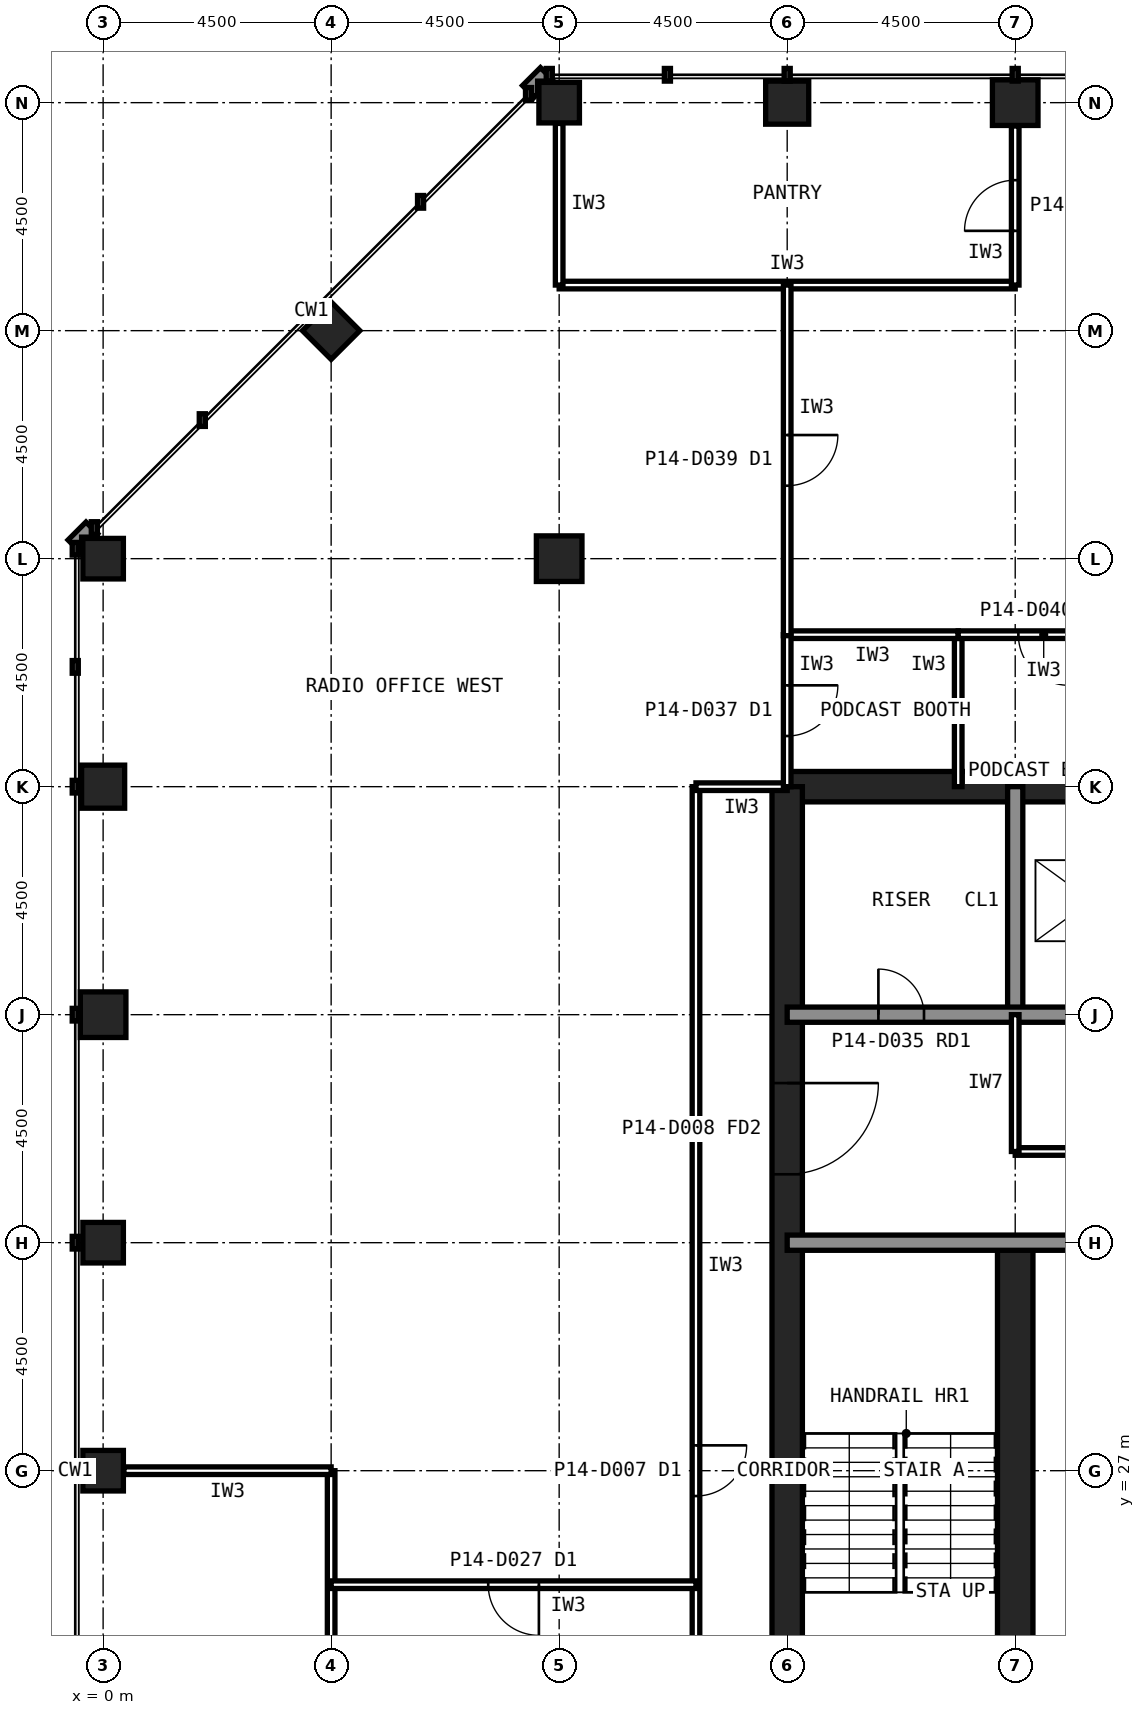
"""IFC4 building model, lengths in metres.
Left out: names, types, materials, properties, quantities, classifications, styles, units other than length and angle.
Written with IfcOpenShell. Run it as: python <this file> out.ifc"""

import sys

from ifc_helpers import new_model, si_unit, direction, frame, frame_2d, origin, origin_2d, place, context, subcontext, project, spatial, rectangle, hollow_rectangle, extrude, element, fill, save


model = new_model("IFC4")
c1 = context("Model", 3, precision=1e-05, world=origin(), true_north=direction((0.0, 1.0)))
c2 = subcontext(c1, "Body", "Model", "MODEL_VIEW")
j1 = project(units=[si_unit("LENGTHUNIT", "METRE"), si_unit("PLANEANGLEUNIT", "RADIAN")], contexts=[c1])
p1 = place(None, origin())
s1 = spatial("IfcSite", under=j1, at=p1, CompositionType="ELEMENT")
p2 = place(p1, origin())
s2 = spatial("IfcBuilding", under=s1, at=p2, CompositionType="ELEMENT")
p3 = place(p2, frame((0.0, 0.0, 62.6)))
s3 = spatial("IfcBuildingStorey", under=s2, at=p3, CompositionType="ELEMENT", Elevation=62.6)
p4 = place(p3, frame((18.0, 54.0, 0.0), z_axis=(0.0, 0.0, 1.0), x_axis=(1.0, 0.0, 0.0)))
e1 = element("IfcColumn", 1, at=p4, inside=s3, PredefinedType="COLUMN", context=c2, shape_type="SweptSolid", body=[
    extrude(hollow_rectangle(XDim=0.9, YDim=0.9, WallThickness=0.063, at=origin_2d()), origin(), (0.0, 0.0, 1.0), 4.2),
])
p5 = place(p3, frame((13.5, 54.0, 0.0), z_axis=(0.0, 0.0, 1.0), x_axis=(1.0, 0.0, 0.0)))
e2 = element("IfcColumn", 2, at=p5, inside=s3, PredefinedType="COLUMN", context=c2, shape_type="SweptSolid", body=[
    extrude(hollow_rectangle(XDim=0.85, YDim=0.85, WallThickness=0.05, at=origin_2d()), origin(), (0.0, 0.0, 1.0), 4.2),
])
for number, where, z_axis, x_axis in (
    (3, (9.0, 54.0, 0.0), (0.0, 0.0, 1.0), (1.0, 0.0, 0.0)),
    (4, (0.0, 45.0, 0.0), (0.0, 0.0, 1.0), (1.0, 0.0, 0.0)),
):
    element("IfcColumn", number, at=place(p3, frame(where, z_axis=z_axis, x_axis=x_axis)), inside=s3, PredefinedType="COLUMN", context=c2, shape_type="SweptSolid", body=[
        extrude(hollow_rectangle(XDim=0.8, YDim=0.8, WallThickness=0.045, at=origin_2d()), origin(), (0.0, 0.0, 1.0), 4.2),
    ])
p6 = place(p3, frame((0.0, 40.5, 0.0), z_axis=(0.0, 0.0, 1.0), x_axis=(1.0, 0.0, 0.0)))
e5 = element("IfcColumn", 5, at=p6, inside=s3, PredefinedType="COLUMN", context=c2, shape_type="SweptSolid", body=[
    extrude(hollow_rectangle(XDim=0.85, YDim=0.85, WallThickness=0.05, at=origin_2d()), origin(), (0.0, 0.0, 1.0), 4.2),
])
p7 = place(p3, frame((0.0, 36.0, 0.0), z_axis=(0.0, 0.0, 1.0), x_axis=(1.0, 0.0, 0.0)))
e6 = element("IfcColumn", 6, at=p7, inside=s3, PredefinedType="COLUMN", context=c2, shape_type="SweptSolid", body=[
    extrude(hollow_rectangle(XDim=0.9, YDim=0.9, WallThickness=0.063, at=origin_2d()), origin(), (0.0, 0.0, 1.0), 4.2),
])
for number, where, z_axis, x_axis in (
    (7, (0.0, 31.5, 0.0), (0.0, 0.0, 1.0), (1.0, 0.0, 0.0)),
    (8, (0.0, 27.0, 0.0), (0.0, 0.0, 1.0), (1.0, 0.0, 0.0)),
    (9, (4.5, 49.5, 0.0), (0.0, 0.0, 1.0), (0.707, 0.707, 0.0)),
):
    element("IfcColumn", number, at=place(p3, frame(where, z_axis=z_axis, x_axis=x_axis)), inside=s3, PredefinedType="COLUMN", context=c2, shape_type="SweptSolid", body=[
        extrude(hollow_rectangle(XDim=0.8, YDim=0.8, WallThickness=0.045, at=origin_2d()), origin(), (0.0, 0.0, 1.0), 4.2),
    ])
p8 = place(p3, frame((9.0, 45.0, 0.0), z_axis=(0.0, 0.0, 1.0), x_axis=(1.0, 0.0, 0.0)))
e10 = element("IfcColumn", 10, at=p8, inside=s3, PredefinedType="COLUMN", context=c2, shape_type="SweptSolid", body=[
    extrude(hollow_rectangle(XDim=0.9, YDim=0.9, WallThickness=0.063, at=origin_2d()), origin(), (0.0, 0.0, 1.0), 4.2),
])
p9 = place(p3, frame((40.5, 40.5, 0.0), z_axis=(0.0, 0.0, 1.0), x_axis=(-1.0, 0.0, 0.0)))
e11 = element("IfcWall", 11, at=p9, inside=s3, PredefinedType="SHEAR", context=c2, shape_type="SweptSolid", body=[
    extrude(rectangle(XDim=27.0, YDim=0.6, at=frame_2d((13.5, 0.0))), origin(), (0.0, 0.0, 1.0), 4.2),
])
p10 = place(p3, frame((13.5, 40.5, 0.0), z_axis=(0.0, 0.0, 1.0), x_axis=(0.0, -1.0, 0.0)))
e12 = element("IfcWall", 12, at=p10, inside=s3, PredefinedType="SHEAR", context=c2, shape_type="SweptSolid", body=[
    extrude(rectangle(XDim=27.0, YDim=0.6, at=frame_2d((13.5, 0.0))), origin(), (0.0, 0.0, 1.0), 4.2),
])
p11 = place(p10, frame((19.65, 0.0, 0.0)))
e13 = element("IfcOpeningElement", 13, at=p11, cuts=e12, PredefinedType="OPENING", context=c2, shape_type="SweptSolid", body=[
    extrude(rectangle(XDim=1.2, YDim=2.1, at=frame_2d((0.6, 1.05))), frame((0.0, 0.31, 0.0), z_axis=(0.0, -1.0, 0.0), x_axis=(1.0, 0.0, 0.0)), (0.0, 0.0, 1.0), 0.62),
])
p12 = place(p10, frame((5.85, 0.0, 0.0)))
e14 = element("IfcOpeningElement", 14, at=p12, cuts=e12, PredefinedType="OPENING", context=c2, shape_type="SweptSolid", body=[
    extrude(rectangle(XDim=1.8, YDim=2.1, at=frame_2d((0.9, 1.05))), frame((0.0, 0.31, 0.0), z_axis=(0.0, -1.0, 0.0), x_axis=(1.0, 0.0, 0.0)), (0.0, 0.0, 1.0), 0.62),
])
p13 = place(p3, frame((18.0, 13.5, 0.0), z_axis=(0.0, 0.0, 1.0), x_axis=(0.0, 1.0, 0.0)))
e15 = element("IfcWall", 15, at=p13, inside=s3, PredefinedType="SHEAR", context=c2, shape_type="SweptSolid", body=[
    extrude(rectangle(XDim=18.0, YDim=0.7, at=frame_2d((9.0, 0.0))), origin(), (0.0, 0.0, 1.0), 4.2),
])
p14 = place(p3, frame((18.0, 36.0, 0.0), z_axis=(0.0, 0.0, 1.0), x_axis=(0.0, 1.0, 0.0)))
e16 = element("IfcWall", 16, at=p14, inside=s3, PredefinedType="SOLIDWALL", context=c2, shape_type="SweptSolid", body=[
    extrude(rectangle(XDim=4.5, YDim=0.3, at=frame_2d((2.25, 0.0))), origin(), (0.0, 0.0, 1.0), 4.04),
])
p15 = place(p3, frame((13.5, 36.0, 0.0), z_axis=(0.0, 0.0, 1.0), x_axis=(1.0, 0.0, 0.0)))
e17 = element("IfcWall", 17, at=p15, inside=s3, PredefinedType="SOLIDWALL", context=c2, shape_type="SweptSolid", body=[
    extrude(rectangle(XDim=27.0, YDim=0.3, at=frame_2d((13.5, 0.0))), origin(), (0.0, 0.0, 1.0), 4.04),
])
p16 = place(p15, frame((1.8, 0.0, 0.0)))
e18 = element("IfcOpeningElement", 18, at=p16, cuts=e17, PredefinedType="OPENING", context=c2, shape_type="SweptSolid", body=[
    extrude(rectangle(XDim=0.9, YDim=2.1, at=frame_2d((0.45, 1.05))), frame((0.0, 0.16, 0.0), z_axis=(0.0, -1.0, 0.0), x_axis=(1.0, 0.0, 0.0)), (0.0, 0.0, 1.0), 0.32),
])
p17 = place(p15, frame((24.1, 0.0, 0.0)))
e19 = element("IfcOpeningElement", 19, at=p17, cuts=e17, PredefinedType="OPENING", context=c2, shape_type="SweptSolid", body=[
    extrude(rectangle(XDim=1.3, YDim=2.2, at=frame_2d((0.65, 1.1))), frame((0.0, 0.16, 0.0), z_axis=(0.0, -1.0, 0.0), x_axis=(1.0, 0.0, 0.0)), (0.0, 0.0, 1.0), 0.32),
])
p18 = place(p3, frame((13.5, 31.5, 0.0), z_axis=(0.0, 0.0, 1.0), x_axis=(1.0, 0.0, 0.0)))
e20 = element("IfcWall", 20, at=p18, inside=s3, PredefinedType="SOLIDWALL", context=c2, shape_type="SweptSolid", body=[
    extrude(rectangle(XDim=27.0, YDim=0.3, at=frame_2d((13.5, 0.0))), origin(), (0.0, 0.0, 1.0), 4.04),
])
p19 = place(p18, frame((24.15, 0.0, 0.0)))
e21 = element("IfcOpeningElement", 21, at=p19, cuts=e20, PredefinedType="OPENING", context=c2, shape_type="SweptSolid", body=[
    extrude(rectangle(XDim=1.2, YDim=2.1, at=frame_2d((0.6, 1.05))), frame((0.0, 0.16, 0.0), z_axis=(0.0, -1.0, 0.0), x_axis=(1.0, 0.0, 0.0)), (0.0, 0.0, 1.0), 0.32),
])
p20 = place(p18, frame((15.3, 0.0, 0.0)))
e22 = element("IfcOpeningElement", 22, at=p20, cuts=e20, PredefinedType="OPENING", context=c2, shape_type="SweptSolid", body=[
    extrude(rectangle(XDim=0.9, YDim=2.1, at=frame_2d((0.45, 1.05))), frame((0.0, 0.16, 0.0), z_axis=(0.0, -1.0, 0.0), x_axis=(1.0, 0.0, 0.0)), (0.0, 0.0, 1.0), 0.32),
])
p21 = place(p18, frame((19.8, 0.0, 0.0)))
e23 = element("IfcOpeningElement", 23, at=p21, cuts=e20, PredefinedType="OPENING", context=c2, shape_type="SweptSolid", body=[
    extrude(rectangle(XDim=0.9, YDim=2.1, at=frame_2d((0.45, 1.05))), frame((0.0, 0.16, 0.0), z_axis=(0.0, -1.0, 0.0), x_axis=(1.0, 0.0, 0.0)), (0.0, 0.0, 1.0), 0.32),
])
p22 = place(p3, frame((18.0, 33.3, 0.0), z_axis=(0.0, 0.0, 1.0), x_axis=(1.0, 0.0, 0.0)))
e24 = element("IfcWall", 24, at=p22, inside=s3, PredefinedType="PARTITIONING", context=c2, shape_type="SweptSolid", body=[
    extrude(rectangle(XDim=12.0, YDim=0.15, at=frame_2d((6.0, 0.0))), origin(), (0.0, 0.0, 1.0), 4.04),
])
p23 = place(p22, frame((2.55, 0.0, 0.0)))
e25 = element("IfcOpeningElement", 25, at=p23, cuts=e24, PredefinedType="OPENING", context=c2, shape_type="SweptSolid", body=[
    extrude(rectangle(XDim=0.9, YDim=2.1, at=frame_2d((0.45, 1.05))), frame((0.0, 0.085, 0.0), z_axis=(0.0, -1.0, 0.0), x_axis=(1.0, 0.0, 0.0)), (0.0, 0.0, 1.0), 0.17),
])
p24 = place(p22, frame((8.55, 0.0, 0.0)))
e26 = element("IfcOpeningElement", 26, at=p24, cuts=e24, PredefinedType="OPENING", context=c2, shape_type="SweptSolid", body=[
    extrude(rectangle(XDim=0.9, YDim=2.1, at=frame_2d((0.45, 1.05))), frame((0.0, 0.085, 0.0), z_axis=(0.0, -1.0, 0.0), x_axis=(1.0, 0.0, 0.0)), (0.0, 0.0, 1.0), 0.17),
])
p25 = place(p3, frame((18.0, 33.3, 0.0), z_axis=(0.0, 0.0, 1.0), x_axis=(0.0, 1.0, 0.0)))
e27 = element("IfcWall", 27, at=p25, inside=s3, PredefinedType="PARTITIONING", context=c2, shape_type="SweptSolid", body=[
    extrude(rectangle(XDim=2.7, YDim=0.15, at=frame_2d((1.35, 0.0))), origin(), (0.0, 0.0, 1.0), 4.04),
])
p26 = place(p3, frame((11.7, 40.5, 0.0), z_axis=(0.0, 0.0, 1.0), x_axis=(0.0, -1.0, 0.0)))
e28 = element("IfcWall", 28, at=p26, inside=s3, PredefinedType="PARTITIONING", context=c2, shape_type="SweptSolid", body=[
    extrude(rectangle(XDim=27.0, YDim=0.15, at=frame_2d((13.5, 0.0))), origin(), (0.0, 0.0, 1.0), 4.04),
])
p27 = place(p26, frame((13.0, 0.0, 0.0)))
e29 = element("IfcOpeningElement", 29, at=p27, cuts=e28, PredefinedType="OPENING", context=c2, shape_type="SweptSolid", body=[
    extrude(rectangle(XDim=1.0, YDim=2.1, at=frame_2d((0.5, 1.05))), frame((0.0, 0.085, 0.0), z_axis=(0.0, -1.0, 0.0), x_axis=(1.0, 0.0, 0.0)), (0.0, 0.0, 1.0), 0.17),
])
p28 = place(p3, frame((13.5, 40.5, 0.0), z_axis=(0.0, 0.0, 1.0), x_axis=(-1.0, 0.0, 0.0)))
e30 = element("IfcWall", 30, at=p28, inside=s3, PredefinedType="PARTITIONING", context=c2, shape_type="SweptSolid", body=[
    extrude(rectangle(XDim=1.8, YDim=0.15, at=frame_2d((0.9, 0.0))), origin(), (0.0, 0.0, 1.0), 3.189),
])
p29 = place(p3, frame((16.875, 40.5, 0.0), z_axis=(0.0, 0.0, 1.0), x_axis=(0.0, 1.0, 0.0)))
e31 = element("IfcWall", 31, at=p29, inside=s3, PredefinedType="PARTITIONING", context=c2, shape_type="SweptSolid", body=[
    extrude(rectangle(XDim=3.0, YDim=0.15, at=frame_2d((1.5, 0.0))), origin(), (0.0, 0.0, 1.0), 4.04),
])
p30 = place(p3, frame((16.875, 43.5, 0.0), z_axis=(0.0, 0.0, 1.0), x_axis=(-1.0, 0.0, 0.0)))
e32 = element("IfcWall", 32, at=p30, inside=s3, PredefinedType="PARTITIONING", context=c2, shape_type="SweptSolid", body=[
    extrude(rectangle(XDim=3.375, YDim=0.15, at=frame_2d((1.688, 0.0))), origin(), (0.0, 0.0, 1.0), 4.04),
])
p31 = place(p3, frame((13.5, 43.5, 0.0), z_axis=(0.0, 0.0, 1.0), x_axis=(0.0, -1.0, 0.0)))
e33 = element("IfcWall", 33, at=p31, inside=s3, PredefinedType="PARTITIONING", context=c2, shape_type="SweptSolid", body=[
    extrude(rectangle(XDim=3.0, YDim=0.15, at=frame_2d((1.5, 0.0))), origin(), (0.0, 0.0, 1.0), 3.189),
])
p32 = place(p31, frame((1.0, 0.0, 0.0)))
e34 = element("IfcOpeningElement", 34, at=p32, cuts=e33, PredefinedType="OPENING", context=c2, shape_type="SweptSolid", body=[
    extrude(rectangle(XDim=1.0, YDim=2.1, at=frame_2d((0.5, 1.05))), frame((0.0, 0.085, 0.0), z_axis=(0.0, -1.0, 0.0), x_axis=(1.0, 0.0, 0.0)), (0.0, 0.0, 1.0), 0.17),
])
p33 = place(p3, frame((20.25, 43.5, 0.0), z_axis=(0.0, 0.0, 1.0), x_axis=(-1.0, 0.0, 0.0)))
e35 = element("IfcWall", 35, at=p33, inside=s3, PredefinedType="PARTITIONING", context=c2, shape_type="SweptSolid", body=[
    extrude(rectangle(XDim=3.375, YDim=0.15, at=frame_2d((1.688, 0.0))), origin(), (0.0, 0.0, 1.0), 4.04),
])
p34 = place(p33, frame((1.188, 0.0, 0.0)))
e36 = element("IfcOpeningElement", 36, at=p34, cuts=e35, PredefinedType="OPENING", context=c2, shape_type="SweptSolid", body=[
    extrude(rectangle(XDim=1.0, YDim=2.1, at=frame_2d((0.5, 1.05))), frame((0.0, 0.085, 0.0), z_axis=(0.0, -1.0, 0.0), x_axis=(1.0, 0.0, 0.0)), (0.0, 0.0, 1.0), 0.17),
])
p35 = place(p3, frame((4.5, 18.0, 0.0), z_axis=(0.0, 0.0, 1.0), x_axis=(0.0, 1.0, 0.0)))
e37 = element("IfcWall", 37, at=p35, inside=s3, PredefinedType="PARTITIONING", context=c2, shape_type="SweptSolid", body=[
    extrude(rectangle(XDim=9.0, YDim=0.15, at=frame_2d((4.5, 0.0))), origin(), (0.0, 0.0, 1.0), 4.04),
])
p36 = place(p35, frame((4.0, 0.0, 0.0)))
e38 = element("IfcOpeningElement", 38, at=p36, cuts=e37, PredefinedType="OPENING", context=c2, shape_type="SweptSolid", body=[
    extrude(rectangle(XDim=1.0, YDim=2.1, at=frame_2d((0.5, 1.05))), frame((0.0, 0.085, 0.0), z_axis=(0.0, -1.0, 0.0), x_axis=(1.0, 0.0, 0.0)), (0.0, 0.0, 1.0), 0.17),
])
p37 = place(p3, frame((4.5, 27.0, 0.0), z_axis=(0.0, 0.0, 1.0), x_axis=(-1.0, 0.0, 0.0)))
e39 = element("IfcWall", 39, at=p37, inside=s3, PredefinedType="PARTITIONING", context=c2, shape_type="SweptSolid", body=[
    extrude(rectangle(XDim=4.09, YDim=0.15, at=frame_2d((2.045, 0.0))), origin(), (0.0, 0.0, 1.0), 3.189),
])
p38 = place(p3, frame((9.0, 50.4, 0.0), z_axis=(0.0, 0.0, 1.0), x_axis=(1.0, 0.0, 0.0)))
e40 = element("IfcWall", 40, at=p38, inside=s3, PredefinedType="PARTITIONING", context=c2, shape_type="SweptSolid", body=[
    extrude(rectangle(XDim=9.0, YDim=0.15, at=frame_2d((4.5, 0.0))), origin(), (0.0, 0.0, 1.0), 4.04),
])
p39 = place(p3, frame((18.0, 50.4, 0.0), z_axis=(0.0, 0.0, 1.0), x_axis=(0.0, 1.0, 0.0)))
e41 = element("IfcWall", 41, at=p39, inside=s3, PredefinedType="PARTITIONING", context=c2, shape_type="SweptSolid", body=[
    extrude(rectangle(XDim=3.14, YDim=0.15, at=frame_2d((1.57, 0.0))), origin(), (0.0, 0.0, 1.0), 3.189),
])
p40 = place(p39, frame((1.07, 0.0, 0.0)))
e42 = element("IfcOpeningElement", 42, at=p40, cuts=e41, PredefinedType="OPENING", context=c2, shape_type="SweptSolid", body=[
    extrude(rectangle(XDim=1.0, YDim=2.1, at=frame_2d((0.5, 1.05))), frame((0.0, 0.085, 0.0), z_axis=(0.0, -1.0, 0.0), x_axis=(1.0, 0.0, 0.0)), (0.0, 0.0, 1.0), 0.17),
])
p41 = place(p3, frame((9.0, 53.59, 0.0), z_axis=(0.0, 0.0, 1.0), x_axis=(0.0, -1.0, 0.0)))
e43 = element("IfcWall", 43, at=p41, inside=s3, PredefinedType="PARTITIONING", context=c2, shape_type="SweptSolid", body=[
    extrude(rectangle(XDim=3.19, YDim=0.15, at=frame_2d((1.595, 0.0))), origin(), (0.0, 0.0, 1.0), 3.429),
])
p42 = place(p3, frame((13.5, 50.4, 0.0), z_axis=(0.0, 0.0, 1.0), x_axis=(0.0, -1.0, 0.0)))
e44 = element("IfcWall", 44, at=p42, inside=s3, PredefinedType="PARTITIONING", context=c2, shape_type="SweptSolid", body=[
    extrude(rectangle(XDim=6.92, YDim=0.15, at=frame_2d((3.46, 0.0))), origin(), (0.0, 0.0, 1.0), 3.189),
])
p43 = place(p42, frame((2.96, 0.0, 0.0)))
e45 = element("IfcOpeningElement", 45, at=p43, cuts=e44, PredefinedType="OPENING", context=c2, shape_type="SweptSolid", body=[
    extrude(rectangle(XDim=1.0, YDim=2.1, at=frame_2d((0.5, 1.05))), frame((0.0, 0.085, 0.0), z_axis=(0.0, -1.0, 0.0), x_axis=(1.0, 0.0, 0.0)), (0.0, 0.0, 1.0), 0.17),
])
p44 = place(p3, frame((11.7, 24.75, 0.0), z_axis=(0.0, 0.0, 1.0), x_axis=(-1.0, 0.0, 0.0)))
e46 = element("IfcWall", 46, at=p44, inside=s3, PredefinedType="PARTITIONING", context=c2, shape_type="SweptSolid", body=[
    extrude(rectangle(XDim=7.2, YDim=0.15, at=frame_2d((3.6, 0.0))), origin(), (0.0, 0.0, 1.0), 4.04),
])
p45 = place(p44, frame((3.1, 0.0, 0.0)))
e47 = element("IfcOpeningElement", 47, at=p45, cuts=e46, PredefinedType="OPENING", context=c2, shape_type="SweptSolid", body=[
    extrude(rectangle(XDim=1.0, YDim=2.1, at=frame_2d((0.5, 1.05))), frame((0.0, 0.085, 0.0), z_axis=(0.0, -1.0, 0.0), x_axis=(1.0, 0.0, 0.0)), (0.0, 0.0, 1.0), 0.17),
])
p46 = place(p12, origin())
e48 = element("IfcDoor", 48, at=p46, inside=s3, OperationType="SINGLE_SWING_LEFT", PredefinedType="DOOR", context=c2, shape_type="SweptSolid", body=[
    extrude(rectangle(XDim=1.8, YDim=2.1, at=frame_2d((0.9, 1.05))), frame((0.0, 0.025, 0.0), z_axis=(0.0, -1.0, 0.0), x_axis=(1.0, 0.0, 0.0)), (0.0, 0.0, 1.0), 0.05),
])
fill(e14, e48)
p47 = place(p16, origin())
e49 = element("IfcDoor", 49, at=p47, inside=s3, OperationType="SINGLE_SWING_LEFT", PredefinedType="DOOR", context=c2, shape_type="SweptSolid", body=[
    extrude(rectangle(XDim=0.9, YDim=2.1, at=frame_2d((0.45, 1.05))), frame((0.0, 0.025, 0.0), z_axis=(0.0, -1.0, 0.0), x_axis=(1.0, 0.0, 0.0)), (0.0, 0.0, 1.0), 0.05),
])
fill(e18, e49)
p48 = place(p27, origin())
e50 = element("IfcDoor", 50, at=p48, inside=s3, OperationType="SINGLE_SWING_LEFT", PredefinedType="DOOR", context=c2, shape_type="SweptSolid", body=[
    extrude(rectangle(XDim=1.0, YDim=2.1, at=frame_2d((0.5, 1.05))), frame((0.0, 0.025, 0.0), z_axis=(0.0, -1.0, 0.0), x_axis=(1.0, 0.0, 0.0)), (0.0, 0.0, 1.0), 0.05),
])
fill(e29, e50)
p49 = place(p32, origin())
e51 = element("IfcDoor", 51, at=p49, inside=s3, OperationType="SINGLE_SWING_LEFT", PredefinedType="DOOR", context=c2, shape_type="SweptSolid", body=[
    extrude(rectangle(XDim=1.0, YDim=2.1, at=frame_2d((0.5, 1.05))), frame((0.0, 0.025, 0.0), z_axis=(0.0, -1.0, 0.0), x_axis=(1.0, 0.0, 0.0)), (0.0, 0.0, 1.0), 0.05),
])
fill(e34, e51)
p50 = place(p34, origin())
e52 = element("IfcDoor", 52, at=p50, inside=s3, OperationType="SINGLE_SWING_LEFT", PredefinedType="DOOR", context=c2, shape_type="SweptSolid", body=[
    extrude(rectangle(XDim=1.0, YDim=2.1, at=frame_2d((0.5, 1.05))), frame((0.0, 0.025, 0.0), z_axis=(0.0, -1.0, 0.0), x_axis=(1.0, 0.0, 0.0)), (0.0, 0.0, 1.0), 0.05),
])
fill(e36, e52)
p51 = place(p40, origin())
e53 = element("IfcDoor", 53, at=p51, inside=s3, OperationType="SINGLE_SWING_LEFT", PredefinedType="DOOR", context=c2, shape_type="SweptSolid", body=[
    extrude(rectangle(XDim=1.0, YDim=2.1, at=frame_2d((0.5, 1.05))), frame((0.0, 0.025, 0.0), z_axis=(0.0, -1.0, 0.0), x_axis=(1.0, 0.0, 0.0)), (0.0, 0.0, 1.0), 0.05),
])
fill(e42, e53)
p52 = place(p43, origin())
e54 = element("IfcDoor", 54, at=p52, inside=s3, OperationType="SINGLE_SWING_LEFT", PredefinedType="DOOR", context=c2, shape_type="SweptSolid", body=[
    extrude(rectangle(XDim=1.0, YDim=2.1, at=frame_2d((0.5, 1.05))), frame((0.0, 0.025, 0.0), z_axis=(0.0, -1.0, 0.0), x_axis=(1.0, 0.0, 0.0)), (0.0, 0.0, 1.0), 0.05),
])
fill(e45, e54)
p53 = place(p45, origin())
e55 = element("IfcDoor", 55, at=p53, inside=s3, OperationType="SINGLE_SWING_LEFT", PredefinedType="DOOR", context=c2, shape_type="SweptSolid", body=[
    extrude(rectangle(XDim=1.0, YDim=2.1, at=frame_2d((0.5, 1.05))), frame((0.0, 0.025, 0.0), z_axis=(0.0, -1.0, 0.0), x_axis=(1.0, 0.0, 0.0)), (0.0, 0.0, 1.0), 0.05),
])
fill(e47, e55)
save(model, sys.argv[1])
